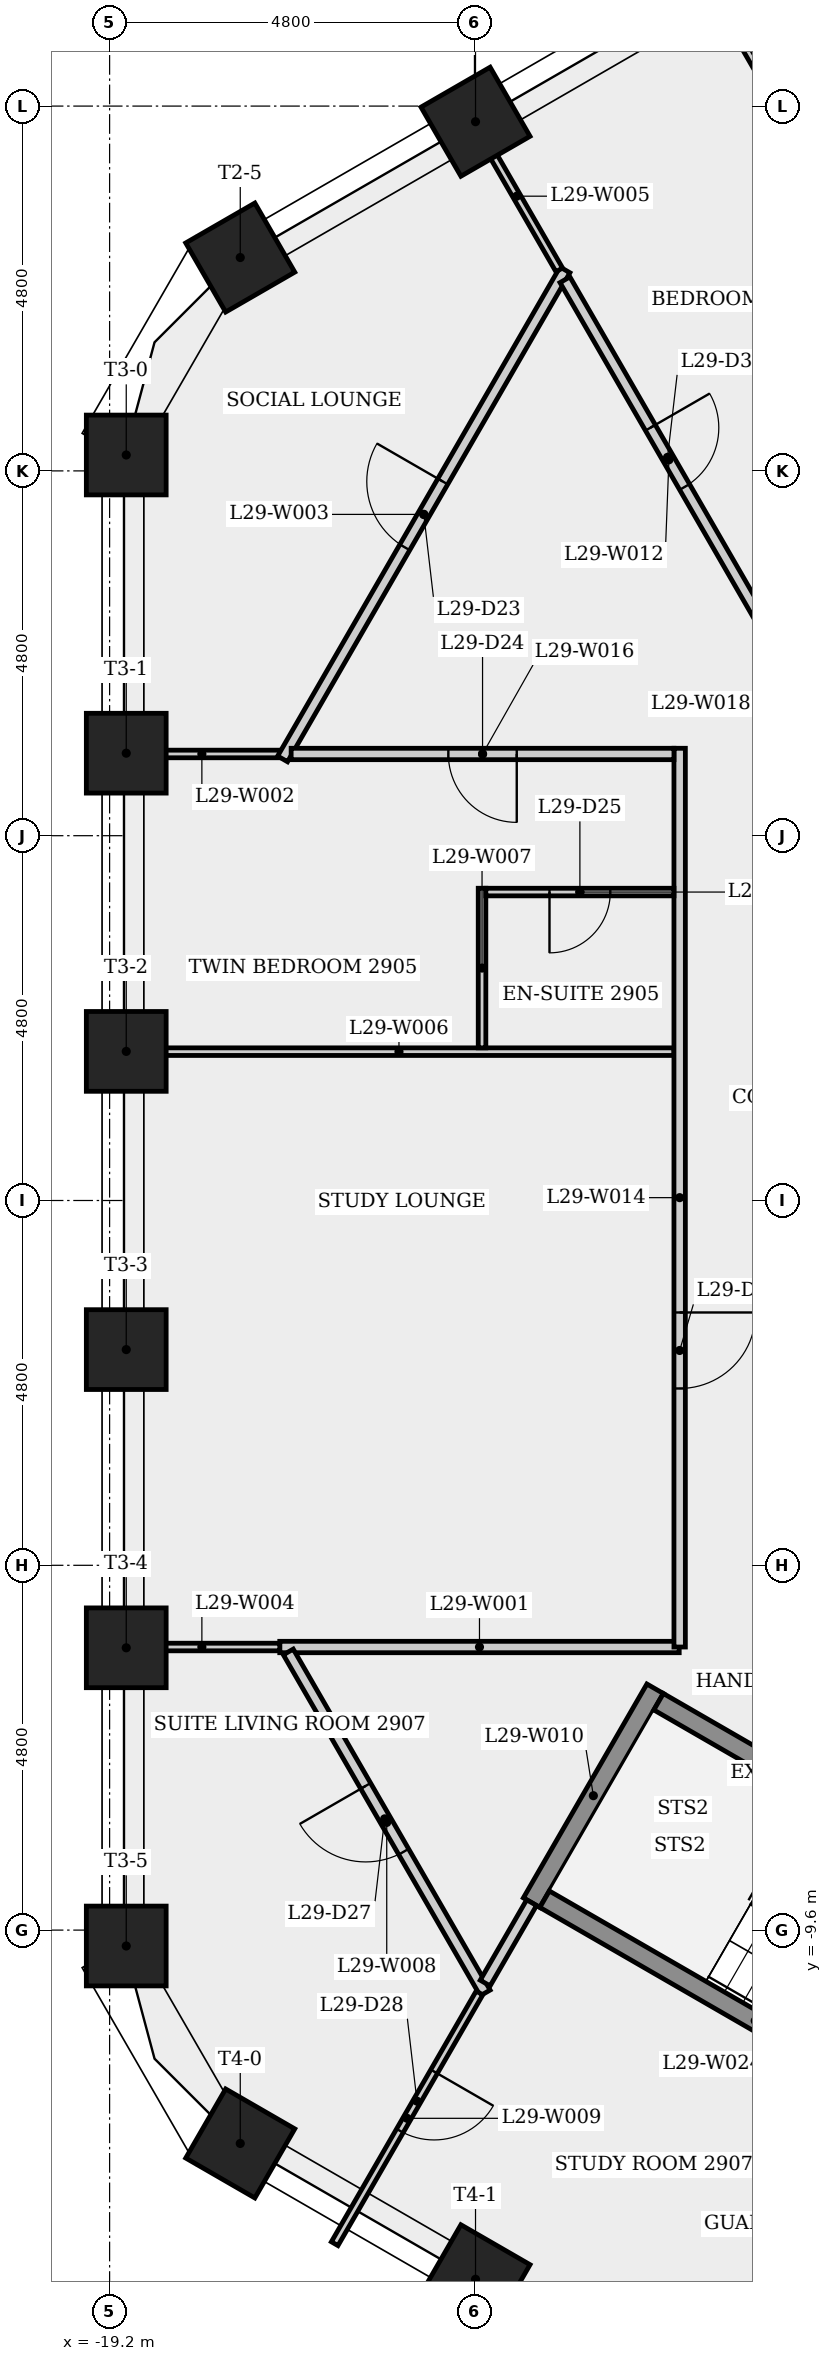
"""IFC4 building model, lengths in metres.
Left out: names, types, materials, properties, quantities, classifications, styles, units other than length and angle.
Written with IfcOpenShell. Run it as: python <this file> out.ifc"""

import sys

from ifc_helpers import new_model, si_unit, direction, frame, frame_2d, origin, origin_2d, place, context, subcontext, project, spatial, rectangle, extrude, element, fill, save


model = new_model("IFC4")
c1 = context("Model", 3, precision=1e-05, world=origin(), true_north=direction((0.0, 1.0)))
c2 = subcontext(c1, "Body", "Model", "MODEL_VIEW")
j1 = project(units=[si_unit("LENGTHUNIT", "METRE"), si_unit("PLANEANGLEUNIT", "RADIAN")], contexts=[c1])
p1 = place(None, origin())
s1 = spatial("IfcSite", under=j1, at=p1, CompositionType="ELEMENT")
p2 = place(p1, origin())
s2 = spatial("IfcBuilding", under=s1, at=p2, CompositionType="ELEMENT")
p3 = place(p2, frame((0.0, 0.0, 110.3)))
s3 = spatial("IfcBuildingStorey", under=s2, at=p3, CompositionType="ELEMENT", Elevation=110.3)
for number, where, z_axis, x_axis in (
    (1, (-14.386, 14.194, 0.0), (0.0, 0.0, 1.0), (-0.5, 0.866, 0.0)),
    (2, (-17.481, 12.407, 0.0), (0.0, 0.0, 1.0), (-0.5, 0.866, 0.0)),
    (3, (-18.981, 9.809, 0.0), (0.0, 0.0, 1.0), (-1.0, 0.0, 0.0)),
    (4, (-18.981, 5.885, 0.0), (0.0, 0.0, 1.0), (-1.0, 0.0, 0.0)),
    (5, (-18.981, 1.962, 0.0), (0.0, 0.0, 1.0), (-1.0, 0.0, 0.0)),
    (6, (-18.981, -1.962, 0.0), (0.0, 0.0, 1.0), (-1.0, 0.0, 0.0)),
    (7, (-18.981, -5.885, 0.0), (0.0, 0.0, 1.0), (-1.0, 0.0, 0.0)),
    (8, (-18.981, -9.809, 0.0), (0.0, 0.0, 1.0), (-1.0, 0.0, 0.0)),
    (9, (-17.481, -12.407, 0.0), (0.0, 0.0, 1.0), (-0.5, -0.866, 0.0)),
    (10, (-14.386, -14.194, 0.0), (0.0, 0.0, 1.0), (-0.5, -0.866, 0.0)),
):
    element("IfcColumn", number, at=place(p3, frame(where, z_axis=z_axis, x_axis=x_axis)), inside=s3, PredefinedType="COLUMN", context=c2, shape_type="SweptSolid", body=[
        extrude(rectangle(XDim=1.05, YDim=1.05, at=origin_2d()), origin(), (0.0, 0.0, 1.0), 3.4),
    ])
p4 = place(p3, frame((-16.961, -5.875, 0.0), z_axis=(0.0, 0.0, 1.0), x_axis=(1.0, 0.0, 0.0)))
e11 = element("IfcWall", 11, at=p4, inside=s3, PredefinedType="PARTITIONING", context=c2, shape_type="SweptSolid", body=[
    extrude(rectangle(XDim=5.256, YDim=0.15, at=frame_2d((2.628, 0.0))), origin(), (0.0, 0.0, 1.0), 3.05),
])
p5 = place(p3, frame((-16.961, 5.875, 0.0), z_axis=(0.0, 0.0, 1.0), x_axis=(-1.0, 0.0, 0.0)))
e12 = element("IfcWall", 12, at=p5, inside=s3, PredefinedType="PARTITIONING", context=c2, shape_type="SweptSolid", body=[
    extrude(rectangle(XDim=2.049, YDim=0.1, at=frame_2d((1.025, 0.0))), origin(), (0.0, 0.0, 1.0), 3.05),
])
p6 = place(p3, frame((-16.924, 5.81, 0.0), z_axis=(0.0, 0.0, 1.0), x_axis=(0.500008780733, 0.866020334166, 0.0)))
e13 = element("IfcWall", 13, at=p6, inside=s3, PredefinedType="PARTITIONING", context=c2, shape_type="SweptSolid", body=[
    extrude(rectangle(XDim=7.43, YDim=0.15, at=frame_2d((3.715, 0.0))), origin(), (0.0, 0.0, 1.0), 3.05),
])
p7 = place(p6, frame((3.215, 0.0, 0.0)))
e14 = element("IfcOpeningElement", 14, at=p7, cuts=e13, PredefinedType="OPENING", context=c2, shape_type="SweptSolid", body=[
    extrude(rectangle(XDim=1.0, YDim=2.1, at=frame_2d((0.5, 1.05))), frame((0.0, 0.085, 0.0), z_axis=(0.0, -1.0, 0.0), x_axis=(1.0, 0.0, 0.0)), (0.0, 0.0, 1.0), 0.17),
])
p8 = place(p3, frame((-16.961, -5.875, 0.0), z_axis=(0.0, 0.0, 1.0), x_axis=(-1.0, 0.0, 0.0)))
e15 = element("IfcWall", 15, at=p8, inside=s3, PredefinedType="PARTITIONING", context=c2, shape_type="SweptSolid", body=[
    extrude(rectangle(XDim=2.049, YDim=0.1, at=frame_2d((1.025, 0.0))), origin(), (0.0, 0.0, 1.0), 3.05),
])
p9 = place(p3, frame((-14.404, 14.184, 0.0), z_axis=(0.0, 0.0, 1.0), x_axis=(0.500008734195, -0.866020361036, 0.0)))
e16 = element("IfcWall", 16, at=p9, inside=s3, PredefinedType="PARTITIONING", context=c2, shape_type="SweptSolid", body=[
    extrude(rectangle(XDim=2.239, YDim=0.1, at=frame_2d((1.12, 0.0))), origin(), (0.0, 0.0, 1.0), 3.05),
])
p10 = place(p3, frame((-19.011, 1.958, 0.0), z_axis=(0.0, 0.0, 1.0), x_axis=(1.0, 0.0, 0.0)))
e17 = element("IfcWall", 17, at=p10, inside=s3, PredefinedType="PARTITIONING", context=c2, shape_type="SweptSolid", body=[
    extrude(rectangle(XDim=7.236, YDim=0.1, at=frame_2d((3.618, 0.0))), origin(), (0.0, 0.0, 1.0), 3.05),
])
p11 = place(p3, frame((-14.3, 4.108, 0.0), z_axis=(0.0, 0.0, 1.0), x_axis=(0.0, -1.0, 0.0)))
e18 = element("IfcWall", 18, at=p11, inside=s3, PredefinedType="PARTITIONING", context=c2, shape_type="SweptSolid", body=[
    extrude(rectangle(XDim=2.1, YDim=0.1, at=frame_2d((1.05, 0.0))), origin(), (0.0, 0.0, 1.0), 3.05),
])
p12 = place(p3, frame((-14.259, -10.427, 0.0), z_axis=(0.0, 0.0, 1.0), x_axis=(-0.500001205343, 0.866024707878, 0.0)))
e19 = element("IfcWall", 19, at=p12, inside=s3, PredefinedType="PARTITIONING", context=c2, shape_type="SweptSolid", body=[
    extrude(rectangle(XDim=5.181, YDim=0.15, at=frame_2d((2.59, 0.0))), origin(), (0.0, 0.0, 1.0), 3.05),
])
p13 = place(p12, frame((2.145, 0.0, 0.0)))
e20 = element("IfcOpeningElement", 20, at=p13, cuts=e19, PredefinedType="OPENING", context=c2, shape_type="SweptSolid", body=[
    extrude(rectangle(XDim=1.0, YDim=2.1, at=frame_2d((0.5, 1.05))), frame((0.0, 0.085, 0.0), z_axis=(0.0, -1.0, 0.0), x_axis=(1.0, 0.0, 0.0)), (0.0, 0.0, 1.0), 0.17),
])
p14 = place(p3, frame((-14.334, -10.427, 0.0), z_axis=(0.0, 0.0, 1.0), x_axis=(-0.500005339912, -0.866022320763, 0.0)))
e21 = element("IfcWall", 21, at=p14, inside=s3, PredefinedType="PARTITIONING", context=c2, shape_type="SweptSolid", body=[
    extrude(rectangle(XDim=3.81, YDim=0.1, at=frame_2d((1.905, 0.0))), origin(), (0.0, 0.0, 1.0), 3.05),
])
p15 = place(p14, frame((1.194, 0.0, 0.0)))
e22 = element("IfcOpeningElement", 22, at=p15, cuts=e21, PredefinedType="OPENING", context=c2, shape_type="SweptSolid", body=[
    extrude(rectangle(XDim=0.9, YDim=2.1, at=frame_2d((0.45, 1.05))), frame((0.0, 0.06, 0.0), z_axis=(0.0, -1.0, 0.0), x_axis=(1.0, 0.0, 0.0)), (0.0, 0.0, 1.0), 0.12),
])
p16 = place(p3, frame((-13.648, -9.239, 0.0), z_axis=(0.0, 0.0, 1.0), x_axis=(0.500017246033, 0.866015446554, 0.0)))
e23 = element("IfcWall", 23, at=p16, inside=s3, PredefinedType="SHEAR", context=c2, shape_type="SweptSolid", body=[
    extrude(rectangle(XDim=3.25, YDim=0.25, at=frame_2d((1.625, 0.0))), origin(), (0.0, 0.0, 1.0), 3.05),
])
p17 = place(p3, frame((-13.648, -9.239, 0.0), z_axis=(0.0, 0.0, 1.0), x_axis=(-0.500114474492, -0.865959301817, 0.0)))
e24 = element("IfcWall", 24, at=p17, inside=s3, PredefinedType="PARTITIONING", context=c2, shape_type="SweptSolid", body=[
    extrude(rectangle(XDim=1.222, YDim=0.15, at=frame_2d((0.611, 0.0))), origin(), (0.0, 0.0, 1.0), 3.05),
])
p18 = place(p3, frame((-13.209, 12.115, 0.0), z_axis=(0.0, 0.0, 1.0), x_axis=(0.499992837287, -0.866029539139, 0.0)))
e25 = element("IfcWall", 25, at=p18, inside=s3, PredefinedType="PARTITIONING", context=c2, shape_type="SweptSolid", body=[
    extrude(rectangle(XDim=5.471, YDim=0.15, at=frame_2d((2.736, 0.0))), origin(), (0.0, 0.0, 1.0), 3.05),
])
p19 = place(p18, frame((2.248, 0.0, 0.0)))
e26 = element("IfcOpeningElement", 26, at=p19, cuts=e25, PredefinedType="OPENING", context=c2, shape_type="SweptSolid", body=[
    extrude(rectangle(XDim=0.9, YDim=2.1, at=frame_2d((0.45, 1.05))), frame((0.0, 0.085, 0.0), z_axis=(0.0, -1.0, 0.0), x_axis=(1.0, 0.0, 0.0)), (0.0, 0.0, 1.0), 0.17),
])
p20 = place(p3, frame((-11.977, -6.595, 0.0), z_axis=(0.0, 0.0, 1.0), x_axis=(0.866025499775, -0.499999833739, 0.0)))
e27 = element("IfcWall", 27, at=p20, inside=s3, PredefinedType="SHEAR", context=c2, shape_type="SweptSolid", body=[
    extrude(rectangle(XDim=6.4, YDim=0.25, at=frame_2d((3.2, 0.0))), origin(), (0.0, 0.0, 1.0), 3.05),
])
p21 = place(p20, frame((5.025, 0.0, 0.0)))
e28 = element("IfcOpeningElement", 28, at=p21, cuts=e27, PredefinedType="OPENING", context=c2, shape_type="SweptSolid", body=[
    extrude(rectangle(XDim=1.0, YDim=2.1, at=frame_2d((0.5, 1.05))), frame((0.0, 0.135, 0.0), z_axis=(0.0, -1.0, 0.0), x_axis=(1.0, 0.0, 0.0)), (0.0, 0.0, 1.0), 0.27),
])
p22 = place(p3, frame((-11.7, 5.95, 0.0), z_axis=(0.0, 0.0, 1.0), x_axis=(0.0, -1.0, 0.0)))
e29 = element("IfcWall", 29, at=p22, inside=s3, PredefinedType="PARTITIONING", context=c2, shape_type="SweptSolid", body=[
    extrude(rectangle(XDim=11.825, YDim=0.15, at=frame_2d((5.913, 0.0))), origin(), (0.0, 0.0, 1.0), 3.05),
])
p23 = place(p22, frame((7.424, 0.0, 0.0)))
e30 = element("IfcOpeningElement", 30, at=p23, cuts=e29, PredefinedType="OPENING", context=c2, shape_type="SweptSolid", body=[
    extrude(rectangle(XDim=1.0, YDim=2.1, at=frame_2d((0.5, 1.05))), frame((0.0, 0.085, 0.0), z_axis=(0.0, -1.0, 0.0), x_axis=(1.0, 0.0, 0.0)), (0.0, 0.0, 1.0), 0.17),
])
p24 = place(p3, frame((-11.775, 4.058, 0.0), z_axis=(0.0, 0.0, 1.0), x_axis=(-1.0, 0.0, 0.0)))
e31 = element("IfcWall", 31, at=p24, inside=s3, PredefinedType="PARTITIONING", context=c2, shape_type="SweptSolid", body=[
    extrude(rectangle(XDim=2.475, YDim=0.1, at=frame_2d((1.238, 0.0))), origin(), (0.0, 0.0, 1.0), 3.05),
])
p25 = place(p24, frame((0.837, 0.0, 0.0)))
e32 = element("IfcOpeningElement", 32, at=p25, cuts=e31, PredefinedType="OPENING", context=c2, shape_type="SweptSolid", body=[
    extrude(rectangle(XDim=0.8, YDim=2.1, at=frame_2d((0.4, 1.05))), frame((0.0, 0.06, 0.0), z_axis=(0.0, -1.0, 0.0), x_axis=(1.0, 0.0, 0.0)), (0.0, 0.0, 1.0), 0.12),
])
p26 = place(p3, frame((-11.775, 5.875, 0.0), z_axis=(0.0, 0.0, 1.0), x_axis=(-1.0, 0.0, 0.0)))
e33 = element("IfcWall", 33, at=p26, inside=s3, PredefinedType="PARTITIONING", context=c2, shape_type="SweptSolid", body=[
    extrude(rectangle(XDim=5.037, YDim=0.15, at=frame_2d((2.518, 0.0))), origin(), (0.0, 0.0, 1.0), 3.05),
])
p27 = place(p26, frame((2.068, 0.0, 0.0)))
e34 = element("IfcOpeningElement", 34, at=p27, cuts=e33, PredefinedType="OPENING", context=c2, shape_type="SweptSolid", body=[
    extrude(rectangle(XDim=0.9, YDim=2.1, at=frame_2d((0.45, 1.05))), frame((0.0, 0.085, 0.0), z_axis=(0.0, -1.0, 0.0), x_axis=(1.0, 0.0, 0.0)), (0.0, 0.0, 1.0), 0.17),
])
p28 = place(p3, frame((-11.296, 15.978, 0.0), z_axis=(0.0, 0.0, 1.0), x_axis=(0.499997453958, -0.866026873738, 0.0)))
e35 = element("IfcWall", 35, at=p28, inside=s3, PredefinedType="PARTITIONING", context=c2, shape_type="SweptSolid", body=[
    extrude(rectangle(XDim=7.71, YDim=0.1, at=frame_2d((3.855, 0.0))), origin(), (0.0, 0.0, 1.0), 3.05),
])
p29 = place(p3, frame((-7.935, -12.393, 0.0), z_axis=(0.0, 0.0, 1.0), x_axis=(-0.866025499775, 0.499999833739, 0.0)))
e36 = element("IfcWall", 36, at=p29, inside=s3, PredefinedType="SHEAR", context=c2, shape_type="SweptSolid", body=[
    extrude(rectangle(XDim=6.4, YDim=0.25, at=frame_2d((3.2, 0.0))), origin(), (0.0, 0.0, 1.0), 3.05),
])
p30 = place(p7, origin())
e37 = element("IfcDoor", 37, at=p30, inside=s3, OperationType="SINGLE_SWING_RIGHT", PredefinedType="DOOR", context=c2, shape_type="SweptSolid", body=[
    extrude(rectangle(XDim=1.0, YDim=2.1, at=frame_2d((0.5, 1.05))), frame((0.0, 0.025, 0.0), z_axis=(0.0, -1.0, 0.0), x_axis=(1.0, 0.0, 0.0)), (0.0, 0.0, 1.0), 0.05),
])
fill(e14, e37)
p31 = place(p27, origin())
e38 = element("IfcDoor", 38, at=p31, inside=s3, OperationType="SINGLE_SWING_LEFT", PredefinedType="DOOR", context=c2, shape_type="SweptSolid", body=[
    extrude(rectangle(XDim=0.9, YDim=2.1, at=frame_2d((0.45, 1.05))), frame((0.0, 0.025, 0.0), z_axis=(0.0, -1.0, 0.0), x_axis=(1.0, 0.0, 0.0)), (0.0, 0.0, 1.0), 0.05),
])
fill(e34, e38)
p32 = place(p25, origin())
e39 = element("IfcDoor", 39, at=p32, inside=s3, OperationType="SINGLE_SWING_RIGHT", PredefinedType="DOOR", context=c2, shape_type="SweptSolid", body=[
    extrude(rectangle(XDim=0.8, YDim=2.1, at=frame_2d((0.4, 1.05))), frame((0.0, 0.025, 0.0), z_axis=(0.0, -1.0, 0.0), x_axis=(1.0, 0.0, 0.0)), (0.0, 0.0, 1.0), 0.05),
])
fill(e32, e39)
p33 = place(p23, origin())
e40 = element("IfcDoor", 40, at=p33, inside=s3, OperationType="SINGLE_SWING_LEFT", PredefinedType="DOOR", context=c2, shape_type="SweptSolid", body=[
    extrude(rectangle(XDim=1.0, YDim=2.1, at=frame_2d((0.5, 1.05))), frame((0.0, 0.025, 0.0), z_axis=(0.0, -1.0, 0.0), x_axis=(1.0, 0.0, 0.0)), (0.0, 0.0, 1.0), 0.05),
])
fill(e30, e40)
p34 = place(p13, origin())
e41 = element("IfcDoor", 41, at=p34, inside=s3, OperationType="SINGLE_SWING_RIGHT", PredefinedType="DOOR", context=c2, shape_type="SweptSolid", body=[
    extrude(rectangle(XDim=1.0, YDim=2.1, at=frame_2d((0.5, 1.05))), frame((0.0, 0.025, 0.0), z_axis=(0.0, -1.0, 0.0), x_axis=(1.0, 0.0, 0.0)), (0.0, 0.0, 1.0), 0.05),
])
fill(e20, e41)
p35 = place(p15, origin())
e42 = element("IfcDoor", 42, at=p35, inside=s3, OperationType="SINGLE_SWING_LEFT", PredefinedType="DOOR", context=c2, shape_type="SweptSolid", body=[
    extrude(rectangle(XDim=0.9, YDim=2.1, at=frame_2d((0.45, 1.05))), frame((0.0, 0.025, 0.0), z_axis=(0.0, -1.0, 0.0), x_axis=(1.0, 0.0, 0.0)), (0.0, 0.0, 1.0), 0.05),
])
fill(e22, e42)
p36 = place(p19, origin())
e43 = element("IfcDoor", 43, at=p36, inside=s3, OperationType="SINGLE_SWING_LEFT", PredefinedType="DOOR", context=c2, shape_type="SweptSolid", body=[
    extrude(rectangle(XDim=0.9, YDim=2.1, at=frame_2d((0.45, 1.05))), frame((0.0, 0.025, 0.0), z_axis=(0.0, -1.0, 0.0), x_axis=(1.0, 0.0, 0.0)), (0.0, 0.0, 1.0), 0.05),
])
fill(e26, e43)
save(model, sys.argv[1])
